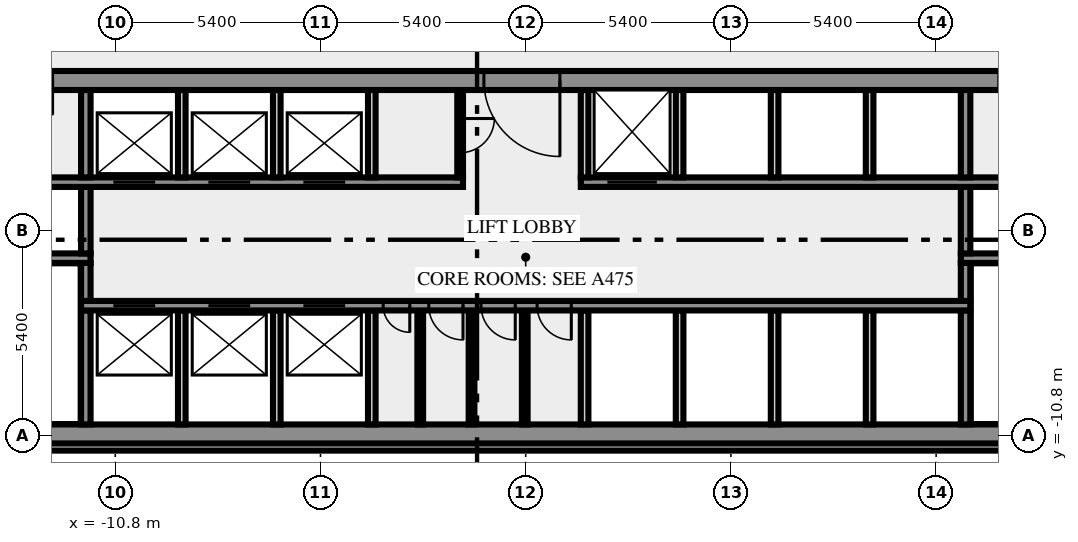
"""IFC4 building model, lengths in metres.
Left out: names, types, materials, properties, quantities, classifications, styles, units other than length and angle.
Written with IfcOpenShell. Run it as: python <this file> out.ifc"""

import sys

from ifc_helpers import new_model, si_unit, direction, frame, frame_2d, origin, place, context, subcontext, project, spatial, rectangle, extrude, element, fill, save


model = new_model("IFC4")
c1 = context("Model", 3, precision=1e-05, world=origin(), true_north=direction((0.0, 1.0)))
c2 = subcontext(c1, "Body", "Model", "MODEL_VIEW")
j1 = project(units=[si_unit("LENGTHUNIT", "METRE"), si_unit("PLANEANGLEUNIT", "RADIAN")], contexts=[c1])
p1 = place(None, origin())
s1 = spatial("IfcSite", under=j1, at=p1, CompositionType="ELEMENT")
p2 = place(p1, origin())
s2 = spatial("IfcBuilding", under=s1, at=p2, CompositionType="ELEMENT")
p3 = place(p2, frame((0.0, 0.0, 129.0)))
s3 = spatial("IfcBuildingStorey", under=s2, at=p3, CompositionType="ELEMENT", Elevation=129.0)
p4 = place(p3, frame((-17.444, -11.088, 0.0), z_axis=(0.0, 0.0, 1.0), x_axis=(1.0, 0.0, 0.0)))
e1 = element("IfcWall", 1, at=p4, inside=s3, PredefinedType="SOLIDWALL", context=c2, shape_type="SweptSolid", body=[
    extrude(rectangle(XDim=34.888, YDim=0.2, at=frame_2d((17.444, 0.0))), origin(), (0.0, 0.0, 1.0), 3.4),
])
p5 = place(p3, frame((-20.0, -10.75, 0.0), z_axis=(0.0, 0.0, 1.0), x_axis=(1.0, 0.0, 0.0)))
e2 = element("IfcWall", 2, at=p5, inside=s3, PredefinedType="SHEAR", context=c2, shape_type="SweptSolid", body=[
    extrude(rectangle(XDim=40.0, YDim=0.5, at=frame_2d((20.0, 0.0))), origin(), (0.0, 0.0, 1.0), 3.4),
])
p6 = place(p5, frame((0.8, 0.0, 1.0)))
e3 = element("IfcOpeningElement", 3, at=p6, cuts=e2, PredefinedType="OPENING", context=c2, shape_type="SweptSolid", body=[
    extrude(rectangle(XDim=1.2, YDim=1.2, at=frame_2d((0.6, 0.6))), frame((0.0, 0.26, 0.0), z_axis=(0.0, -1.0, 0.0), x_axis=(1.0, 0.0, 0.0)), (0.0, 0.0, 1.0), 0.52),
])
p7 = place(p5, frame((38.0, 0.0, 1.0)))
e4 = element("IfcOpeningElement", 4, at=p7, cuts=e2, PredefinedType="OPENING", context=c2, shape_type="SweptSolid", body=[
    extrude(rectangle(XDim=1.2, YDim=1.2, at=frame_2d((0.6, 0.6))), frame((0.0, 0.26, 0.0), z_axis=(0.0, -1.0, 0.0), x_axis=(1.0, 0.0, 0.0)), (0.0, 0.0, 1.0), 0.52),
])
p8 = place(p3, frame((-11.575, -10.5, 0.0), z_axis=(0.0, 0.0, 1.0), x_axis=(0.0, 1.0, 0.0)))
e5 = element("IfcWall", 5, at=p8, inside=s3, PredefinedType="SHEAR", context=c2, shape_type="SweptSolid", body=[
    extrude(rectangle(XDim=3.0, YDim=0.25, at=frame_2d((1.5, 0.0))), origin(), (0.0, 0.0, 1.0), 3.4),
])
for number, where, z_axis, x_axis in (
    (6, (-9.05, -10.5, 0.0), (0.0, 0.0, 1.0), (0.0, 1.0, 0.0)),
    (7, (-6.55, -10.5, 0.0), (0.0, 0.0, 1.0), (0.0, 1.0, 0.0)),
    (8, (-4.05, -10.5, 0.0), (0.0, 0.0, 1.0), (0.0, 1.0, 0.0)),
):
    element("IfcWall", number, at=place(p3, frame(where, z_axis=z_axis, x_axis=x_axis)), inside=s3, PredefinedType="SOLIDWALL", context=c2, shape_type="SweptSolid", body=[
        extrude(rectangle(XDim=3.0, YDim=0.2, at=frame_2d((1.5, 0.0))), origin(), (0.0, 0.0, 1.0), 3.4),
    ])
for number, where, z_axis, x_axis in (
    (9, (-2.775, -10.5, 0.0), (0.0, 0.0, 1.0), (0.0, 1.0, 0.0)),
    (10, (-1.425, -10.5, 0.0), (0.0, 0.0, 1.0), (0.0, 1.0, 0.0)),
    (11, (-0.025, -10.5, 0.0), (0.0, 0.0, 1.0), (0.0, 1.0, 0.0)),
):
    element("IfcWall", number, at=place(p3, frame(where, z_axis=z_axis, x_axis=x_axis)), inside=s3, PredefinedType="PARTITIONING", context=c2, shape_type="SweptSolid", body=[
        extrude(rectangle(XDim=3.0, YDim=0.15, at=frame_2d((1.5, 0.0))), origin(), (0.0, 0.0, 1.0), 3.4),
    ])
for number, where, z_axis, x_axis in (
    (12, (1.55, -10.5, 0.0), (0.0, 0.0, 1.0), (0.0, 1.0, 0.0)),
    (13, (4.05, -10.5, 0.0), (0.0, 0.0, 1.0), (0.0, 1.0, 0.0)),
    (14, (6.55, -10.5, 0.0), (0.0, 0.0, 1.0), (0.0, 1.0, 0.0)),
    (15, (9.05, -10.5, 0.0), (0.0, 0.0, 1.0), (0.0, 1.0, 0.0)),
):
    element("IfcWall", number, at=place(p3, frame(where, z_axis=z_axis, x_axis=x_axis)), inside=s3, PredefinedType="SOLIDWALL", context=c2, shape_type="SweptSolid", body=[
        extrude(rectangle(XDim=3.0, YDim=0.2, at=frame_2d((1.5, 0.0))), origin(), (0.0, 0.0, 1.0), 3.4),
    ])
p9 = place(p3, frame((11.575, -10.5, 0.0), z_axis=(0.0, 0.0, 1.0), x_axis=(0.0, 1.0, 0.0)))
e16 = element("IfcWall", 16, at=p9, inside=s3, PredefinedType="SHEAR", context=c2, shape_type="SweptSolid", body=[
    extrude(rectangle(XDim=3.0, YDim=0.25, at=frame_2d((1.5, 0.0))), origin(), (0.0, 0.0, 1.0), 3.4),
])
p10 = place(p3, frame((11.7, -7.375, 0.0), z_axis=(0.0, 0.0, 1.0), x_axis=(-1.0, 0.0, 0.0)))
e17 = element("IfcWall", 17, at=p10, inside=s3, PredefinedType="SHEAR", context=c2, shape_type="SweptSolid", body=[
    extrude(rectangle(XDim=23.4, YDim=0.25, at=frame_2d((11.7, 0.0))), origin(), (0.0, 0.0, 1.0), 3.4),
])
p11 = place(p10, frame((21.45, 0.0, 0.0)))
e18 = element("IfcOpeningElement", 18, at=p11, cuts=e17, PredefinedType="OPENING", context=c2, shape_type="SweptSolid", body=[
    extrude(rectangle(XDim=1.1, YDim=2.1, at=frame_2d((0.55, 1.05))), frame((0.0, 0.135, 0.0), z_axis=(0.0, -1.0, 0.0), x_axis=(1.0, 0.0, 0.0)), (0.0, 0.0, 1.0), 0.27),
])
p12 = place(p10, frame((18.95, 0.0, 0.0)))
e19 = element("IfcOpeningElement", 19, at=p12, cuts=e17, PredefinedType="OPENING", context=c2, shape_type="SweptSolid", body=[
    extrude(rectangle(XDim=1.1, YDim=2.1, at=frame_2d((0.55, 1.05))), frame((0.0, 0.135, 0.0), z_axis=(0.0, -1.0, 0.0), x_axis=(1.0, 0.0, 0.0)), (0.0, 0.0, 1.0), 0.27),
])
p13 = place(p10, frame((16.45, 0.0, 0.0)))
e20 = element("IfcOpeningElement", 20, at=p13, cuts=e17, PredefinedType="OPENING", context=c2, shape_type="SweptSolid", body=[
    extrude(rectangle(XDim=1.1, YDim=2.1, at=frame_2d((0.55, 1.05))), frame((0.0, 0.135, 0.0), z_axis=(0.0, -1.0, 0.0), x_axis=(1.0, 0.0, 0.0)), (0.0, 0.0, 1.0), 0.27),
])
p14 = place(p10, frame((14.75, 0.0, 0.0)))
e21 = element("IfcOpeningElement", 21, at=p14, cuts=e17, PredefinedType="OPENING", context=c2, shape_type="SweptSolid", body=[
    extrude(rectangle(XDim=0.7, YDim=2.1, at=frame_2d((0.35, 1.05))), frame((0.0, 0.135, 0.0), z_axis=(0.0, -1.0, 0.0), x_axis=(1.0, 0.0, 0.0)), (0.0, 0.0, 1.0), 0.27),
])
p15 = place(p10, frame((13.35, 0.0, 0.0)))
e22 = element("IfcOpeningElement", 22, at=p15, cuts=e17, PredefinedType="OPENING", context=c2, shape_type="SweptSolid", body=[
    extrude(rectangle(XDim=0.9, YDim=2.1, at=frame_2d((0.45, 1.05))), frame((0.0, 0.135, 0.0), z_axis=(0.0, -1.0, 0.0), x_axis=(1.0, 0.0, 0.0)), (0.0, 0.0, 1.0), 0.27),
])
p16 = place(p10, frame((11.975, 0.0, 0.0)))
e23 = element("IfcOpeningElement", 23, at=p16, cuts=e17, PredefinedType="OPENING", context=c2, shape_type="SweptSolid", body=[
    extrude(rectangle(XDim=0.9, YDim=2.1, at=frame_2d((0.45, 1.05))), frame((0.0, 0.135, 0.0), z_axis=(0.0, -1.0, 0.0), x_axis=(1.0, 0.0, 0.0)), (0.0, 0.0, 1.0), 0.27),
])
p17 = place(p10, frame((10.5, 0.0, 0.0)))
e24 = element("IfcOpeningElement", 24, at=p17, cuts=e17, PredefinedType="OPENING", context=c2, shape_type="SweptSolid", body=[
    extrude(rectangle(XDim=0.9, YDim=2.1, at=frame_2d((0.45, 1.05))), frame((0.0, 0.135, 0.0), z_axis=(0.0, -1.0, 0.0), x_axis=(1.0, 0.0, 0.0)), (0.0, 0.0, 1.0), 0.27),
])
for number, where, z_axis, x_axis in (
    (25, (-11.575, -7.25, 0.0), (0.0, 0.0, 1.0), (0.0, 1.0, 0.0)),
    (26, (11.575, -7.25, 0.0), (0.0, 0.0, 1.0), (0.0, 1.0, 0.0)),
):
    element("IfcWall", number, at=place(p3, frame(where, z_axis=z_axis, x_axis=x_axis)), inside=s3, PredefinedType="SHEAR", context=c2, shape_type="SweptSolid", body=[
        extrude(rectangle(XDim=1.0, YDim=0.25, at=frame_2d((0.5, 0.0))), origin(), (0.0, 0.0, 1.0), 3.4),
    ])
p18 = place(p3, frame((-11.45, -6.125, 0.0), z_axis=(0.0, 0.0, 1.0), x_axis=(-1.0, 0.0, 0.0)))
e27 = element("IfcWall", 27, at=p18, inside=s3, PredefinedType="SHEAR", context=c2, shape_type="SweptSolid", body=[
    extrude(rectangle(XDim=8.05, YDim=0.25, at=frame_2d((4.025, 0.0))), origin(), (0.0, 0.0, 1.0), 3.4),
])
p19 = place(p18, frame((6.2, 0.0, 0.0)))
e28 = element("IfcOpeningElement", 28, at=p19, cuts=e27, PredefinedType="OPENING", context=c2, shape_type="SweptSolid", body=[
    extrude(rectangle(XDim=1.8, YDim=2.1, at=frame_2d((0.9, 1.05))), frame((0.0, 0.135, 0.0), z_axis=(0.0, -1.0, 0.0), x_axis=(1.0, 0.0, 0.0)), (0.0, 0.0, 1.0), 0.27),
])
p20 = place(p3, frame((19.5, -6.125, 0.0), z_axis=(0.0, 0.0, 1.0), x_axis=(-1.0, 0.0, 0.0)))
e29 = element("IfcWall", 29, at=p20, inside=s3, PredefinedType="SHEAR", context=c2, shape_type="SweptSolid", body=[
    extrude(rectangle(XDim=8.05, YDim=0.25, at=frame_2d((4.025, 0.0))), origin(), (0.0, 0.0, 1.0), 3.4),
])
p21 = place(p20, frame((0.05, 0.0, 0.0)))
e30 = element("IfcOpeningElement", 30, at=p21, cuts=e29, PredefinedType="OPENING", context=c2, shape_type="SweptSolid", body=[
    extrude(rectangle(XDim=1.8, YDim=2.1, at=frame_2d((0.9, 1.05))), frame((0.0, 0.135, 0.0), z_axis=(0.0, -1.0, 0.0), x_axis=(1.0, 0.0, 0.0)), (0.0, 0.0, 1.0), 0.27),
])
for number, where, z_axis, x_axis in (
    (31, (-11.575, -6.0, 0.0), (0.0, 0.0, 1.0), (0.0, 1.0, 0.0)),
    (32, (11.575, -6.0, 0.0), (0.0, 0.0, 1.0), (0.0, 1.0, 0.0)),
):
    element("IfcWall", number, at=place(p3, frame(where, z_axis=z_axis, x_axis=x_axis)), inside=s3, PredefinedType="SHEAR", context=c2, shape_type="SweptSolid", body=[
        extrude(rectangle(XDim=1.75, YDim=0.25, at=frame_2d((0.875, 0.0))), origin(), (0.0, 0.0, 1.0), 3.4),
    ])
p22 = place(p3, frame((-14.35, -4.125, 0.0), z_axis=(0.0, 0.0, 1.0), x_axis=(1.0, 0.0, 0.0)))
e33 = element("IfcWall", 33, at=p22, inside=s3, PredefinedType="SHEAR", context=c2, shape_type="SweptSolid", body=[
    extrude(rectangle(XDim=12.7, YDim=0.25, at=frame_2d((6.35, 0.0))), origin(), (0.0, 0.0, 1.0), 3.4),
])
p23 = place(p22, frame((3.5, 0.0, 0.0)))
e34 = element("IfcOpeningElement", 34, at=p23, cuts=e33, PredefinedType="OPENING", context=c2, shape_type="SweptSolid", body=[
    extrude(rectangle(XDim=1.1, YDim=2.1, at=frame_2d((0.55, 1.05))), frame((0.0, 0.135, 0.0), z_axis=(0.0, -1.0, 0.0), x_axis=(1.0, 0.0, 0.0)), (0.0, 0.0, 1.0), 0.27),
])
p24 = place(p22, frame((6.0, 0.0, 0.0)))
e35 = element("IfcOpeningElement", 35, at=p24, cuts=e33, PredefinedType="OPENING", context=c2, shape_type="SweptSolid", body=[
    extrude(rectangle(XDim=1.1, YDim=2.1, at=frame_2d((0.55, 1.05))), frame((0.0, 0.135, 0.0), z_axis=(0.0, -1.0, 0.0), x_axis=(1.0, 0.0, 0.0)), (0.0, 0.0, 1.0), 0.27),
])
p25 = place(p22, frame((8.5, 0.0, 0.0)))
e36 = element("IfcOpeningElement", 36, at=p25, cuts=e33, PredefinedType="OPENING", context=c2, shape_type="SweptSolid", body=[
    extrude(rectangle(XDim=1.1, YDim=2.1, at=frame_2d((0.55, 1.05))), frame((0.0, 0.135, 0.0), z_axis=(0.0, -1.0, 0.0), x_axis=(1.0, 0.0, 0.0)), (0.0, 0.0, 1.0), 0.27),
])
p26 = place(p3, frame((1.45, -4.125, 0.0), z_axis=(0.0, 0.0, 1.0), x_axis=(1.0, 0.0, 0.0)))
e37 = element("IfcWall", 37, at=p26, inside=s3, PredefinedType="SHEAR", context=c2, shape_type="SweptSolid", body=[
    extrude(rectangle(XDim=12.9, YDim=0.25, at=frame_2d((6.45, 0.0))), origin(), (0.0, 0.0, 1.0), 3.4),
])
p27 = place(p26, frame((0.7, 0.0, 0.0)))
e38 = element("IfcOpeningElement", 38, at=p27, cuts=e37, PredefinedType="OPENING", context=c2, shape_type="SweptSolid", body=[
    extrude(rectangle(XDim=1.3, YDim=2.1, at=frame_2d((0.65, 1.05))), frame((0.0, 0.135, 0.0), z_axis=(0.0, -1.0, 0.0), x_axis=(1.0, 0.0, 0.0)), (0.0, 0.0, 1.0), 0.27),
])
p28 = place(p3, frame((-11.575, -4.0, 0.0), z_axis=(0.0, 0.0, 1.0), x_axis=(0.0, 1.0, 0.0)))
e39 = element("IfcWall", 39, at=p28, inside=s3, PredefinedType="SHEAR", context=c2, shape_type="SweptSolid", body=[
    extrude(rectangle(XDim=2.3, YDim=0.25, at=frame_2d((1.15, 0.0))), origin(), (0.0, 0.0, 1.0), 3.4),
])
for number, where, z_axis, x_axis in (
    (40, (-9.05, -4.0, 0.0), (0.0, 0.0, 1.0), (0.0, 1.0, 0.0)),
    (41, (-6.55, -4.0, 0.0), (0.0, 0.0, 1.0), (0.0, 1.0, 0.0)),
    (42, (-4.05, -4.0, 0.0), (0.0, 0.0, 1.0), (0.0, 1.0, 0.0)),
):
    element("IfcWall", number, at=place(p3, frame(where, z_axis=z_axis, x_axis=x_axis)), inside=s3, PredefinedType="SOLIDWALL", context=c2, shape_type="SweptSolid", body=[
        extrude(rectangle(XDim=2.3, YDim=0.2, at=frame_2d((1.15, 0.0))), origin(), (0.0, 0.0, 1.0), 3.4),
    ])
p29 = place(p3, frame((-1.725, -1.7, 0.0), z_axis=(0.0, 0.0, 1.0), x_axis=(0.0, -1.0, 0.0)))
e43 = element("IfcWall", 43, at=p29, inside=s3, PredefinedType="PARTITIONING", context=c2, shape_type="SweptSolid", body=[
    extrude(rectangle(XDim=2.3, YDim=0.15, at=frame_2d((1.15, 0.0))), origin(), (0.0, 0.0, 1.0), 3.4),
])
p30 = place(p29, frame((0.75, 0.0, 0.0)))
e44 = element("IfcOpeningElement", 44, at=p30, cuts=e43, PredefinedType="OPENING", context=c2, shape_type="SweptSolid", body=[
    extrude(rectangle(XDim=0.9, YDim=2.1, at=frame_2d((0.45, 1.05))), frame((0.0, 0.085, 0.0), z_axis=(0.0, -1.0, 0.0), x_axis=(1.0, 0.0, 0.0)), (0.0, 0.0, 1.0), 0.17),
])
for number, where, z_axis, x_axis in (
    (45, (1.55, -4.0, 0.0), (0.0, 0.0, 1.0), (0.0, 1.0, 0.0)),
    (46, (4.05, -4.0, 0.0), (0.0, 0.0, 1.0), (0.0, 1.0, 0.0)),
    (47, (6.55, -4.0, 0.0), (0.0, 0.0, 1.0), (0.0, 1.0, 0.0)),
    (48, (9.05, -4.0, 0.0), (0.0, 0.0, 1.0), (0.0, 1.0, 0.0)),
):
    element("IfcWall", number, at=place(p3, frame(where, z_axis=z_axis, x_axis=x_axis)), inside=s3, PredefinedType="SOLIDWALL", context=c2, shape_type="SweptSolid", body=[
        extrude(rectangle(XDim=2.3, YDim=0.2, at=frame_2d((1.15, 0.0))), origin(), (0.0, 0.0, 1.0), 3.4),
    ])
p31 = place(p3, frame((11.575, -4.0, 0.0), z_axis=(0.0, 0.0, 1.0), x_axis=(0.0, 1.0, 0.0)))
e49 = element("IfcWall", 49, at=p31, inside=s3, PredefinedType="SHEAR", context=c2, shape_type="SweptSolid", body=[
    extrude(rectangle(XDim=2.3, YDim=0.25, at=frame_2d((1.15, 0.0))), origin(), (0.0, 0.0, 1.0), 3.4),
])
p32 = place(p3, frame((20.49, -1.45, 0.0), z_axis=(0.0, 0.0, 1.0), x_axis=(-1.0, 0.0, 0.0)))
e50 = element("IfcWall", 50, at=p32, inside=s3, PredefinedType="SHEAR", context=c2, shape_type="SweptSolid", body=[
    extrude(rectangle(XDim=40.98, YDim=0.5, at=frame_2d((20.49, 0.0))), origin(), (0.0, 0.0, 1.0), 3.4),
])
p33 = place(p32, frame((38.14, 0.0, 0.0)))
e51 = element("IfcOpeningElement", 51, at=p33, cuts=e50, PredefinedType="OPENING", context=c2, shape_type="SweptSolid", body=[
    extrude(rectangle(XDim=1.8, YDim=2.1, at=frame_2d((0.9, 1.05))), frame((0.0, 0.26, 0.0), z_axis=(0.0, -1.0, 0.0), x_axis=(1.0, 0.0, 0.0)), (0.0, 0.0, 1.0), 0.52),
])
p34 = place(p32, frame((35.89, 0.0, 0.0)))
e52 = element("IfcOpeningElement", 52, at=p34, cuts=e50, PredefinedType="OPENING", context=c2, shape_type="SweptSolid", body=[
    extrude(rectangle(XDim=0.9, YDim=2.1, at=frame_2d((0.45, 1.05))), frame((0.0, 0.26, 0.0), z_axis=(0.0, -1.0, 0.0), x_axis=(1.0, 0.0, 0.0)), (0.0, 0.0, 1.0), 0.52),
])
p35 = place(p32, frame((32.94, 0.0, 0.0)))
e53 = element("IfcOpeningElement", 53, at=p35, cuts=e50, PredefinedType="OPENING", context=c2, shape_type="SweptSolid", body=[
    extrude(rectangle(XDim=0.9, YDim=2.1, at=frame_2d((0.45, 1.05))), frame((0.0, 0.26, 0.0), z_axis=(0.0, -1.0, 0.0), x_axis=(1.0, 0.0, 0.0)), (0.0, 0.0, 1.0), 0.52),
])
p36 = place(p32, frame((19.59, 0.0, 0.0)))
e54 = element("IfcOpeningElement", 54, at=p36, cuts=e50, PredefinedType="OPENING", context=c2, shape_type="SweptSolid", body=[
    extrude(rectangle(XDim=2.0, YDim=2.1, at=frame_2d((1.0, 1.05))), frame((0.0, 0.26, 0.0), z_axis=(0.0, -1.0, 0.0), x_axis=(1.0, 0.0, 0.0)), (0.0, 0.0, 1.0), 0.52),
])
p37 = place(p32, frame((7.14, 0.0, 0.0)))
e55 = element("IfcOpeningElement", 55, at=p37, cuts=e50, PredefinedType="OPENING", context=c2, shape_type="SweptSolid", body=[
    extrude(rectangle(XDim=0.9, YDim=2.1, at=frame_2d((0.45, 1.05))), frame((0.0, 0.26, 0.0), z_axis=(0.0, -1.0, 0.0), x_axis=(1.0, 0.0, 0.0)), (0.0, 0.0, 1.0), 0.52),
])
p38 = place(p32, frame((5.028, 0.0, 0.0)))
e56 = element("IfcOpeningElement", 56, at=p38, cuts=e50, PredefinedType="OPENING", context=c2, shape_type="SweptSolid", body=[
    extrude(rectangle(XDim=0.8, YDim=2.1, at=frame_2d((0.4, 1.05))), frame((0.0, 0.26, 0.0), z_axis=(0.0, -1.0, 0.0), x_axis=(1.0, 0.0, 0.0)), (0.0, 0.0, 1.0), 0.52),
])
p39 = place(p32, frame((3.452, 0.0, 0.0)))
e57 = element("IfcOpeningElement", 57, at=p39, cuts=e50, PredefinedType="OPENING", context=c2, shape_type="SweptSolid", body=[
    extrude(rectangle(XDim=0.8, YDim=2.1, at=frame_2d((0.4, 1.05))), frame((0.0, 0.26, 0.0), z_axis=(0.0, -1.0, 0.0), x_axis=(1.0, 0.0, 0.0)), (0.0, 0.0, 1.0), 0.52),
])
p40 = place(p32, frame((1.04, 0.0, 0.0)))
e58 = element("IfcOpeningElement", 58, at=p40, cuts=e50, PredefinedType="OPENING", context=c2, shape_type="SweptSolid", body=[
    extrude(rectangle(XDim=1.8, YDim=2.1, at=frame_2d((0.9, 1.05))), frame((0.0, 0.26, 0.0), z_axis=(0.0, -1.0, 0.0), x_axis=(1.0, 0.0, 0.0)), (0.0, 0.0, 1.0), 0.52),
])
p41 = place(p11, origin())
e59 = element("IfcDoor", 59, at=p41, inside=s3, OperationType="DOUBLE_DOOR_SLIDING", PredefinedType="DOOR", context=c2, shape_type="SweptSolid", body=[
    extrude(rectangle(XDim=1.1, YDim=2.1, at=frame_2d((0.55, 1.05))), frame((0.0, 0.025, 0.0), z_axis=(0.0, -1.0, 0.0), x_axis=(1.0, 0.0, 0.0)), (0.0, 0.0, 1.0), 0.05),
])
fill(e18, e59)
p42 = place(p12, origin())
e60 = element("IfcDoor", 60, at=p42, inside=s3, OperationType="DOUBLE_DOOR_SLIDING", PredefinedType="DOOR", context=c2, shape_type="SweptSolid", body=[
    extrude(rectangle(XDim=1.1, YDim=2.1, at=frame_2d((0.55, 1.05))), frame((0.0, 0.025, 0.0), z_axis=(0.0, -1.0, 0.0), x_axis=(1.0, 0.0, 0.0)), (0.0, 0.0, 1.0), 0.05),
])
fill(e19, e60)
p43 = place(p13, origin())
e61 = element("IfcDoor", 61, at=p43, inside=s3, OperationType="DOUBLE_DOOR_SLIDING", PredefinedType="DOOR", context=c2, shape_type="SweptSolid", body=[
    extrude(rectangle(XDim=1.1, YDim=2.1, at=frame_2d((0.55, 1.05))), frame((0.0, 0.025, 0.0), z_axis=(0.0, -1.0, 0.0), x_axis=(1.0, 0.0, 0.0)), (0.0, 0.0, 1.0), 0.05),
])
fill(e20, e61)
p44 = place(p14, origin())
e62 = element("IfcDoor", 62, at=p44, inside=s3, OperationType="SINGLE_SWING_RIGHT", PredefinedType="DOOR", context=c2, shape_type="SweptSolid", body=[
    extrude(rectangle(XDim=0.7, YDim=2.1, at=frame_2d((0.35, 1.05))), frame((0.0, 0.025, 0.0), z_axis=(0.0, -1.0, 0.0), x_axis=(1.0, 0.0, 0.0)), (0.0, 0.0, 1.0), 0.05),
])
fill(e21, e62)
p45 = place(p15, origin())
e63 = element("IfcDoor", 63, at=p45, inside=s3, OperationType="SINGLE_SWING_RIGHT", PredefinedType="DOOR", context=c2, shape_type="SweptSolid", body=[
    extrude(rectangle(XDim=0.9, YDim=2.1, at=frame_2d((0.45, 1.05))), frame((0.0, 0.025, 0.0), z_axis=(0.0, -1.0, 0.0), x_axis=(1.0, 0.0, 0.0)), (0.0, 0.0, 1.0), 0.05),
])
fill(e22, e63)
p46 = place(p16, origin())
e64 = element("IfcDoor", 64, at=p46, inside=s3, OperationType="SINGLE_SWING_RIGHT", PredefinedType="DOOR", context=c2, shape_type="SweptSolid", body=[
    extrude(rectangle(XDim=0.9, YDim=2.1, at=frame_2d((0.45, 1.05))), frame((0.0, 0.025, 0.0), z_axis=(0.0, -1.0, 0.0), x_axis=(1.0, 0.0, 0.0)), (0.0, 0.0, 1.0), 0.05),
])
fill(e23, e64)
p47 = place(p17, origin())
e65 = element("IfcDoor", 65, at=p47, inside=s3, OperationType="SINGLE_SWING_LEFT", PredefinedType="DOOR", context=c2, shape_type="SweptSolid", body=[
    extrude(rectangle(XDim=0.9, YDim=2.1, at=frame_2d((0.45, 1.05))), frame((0.0, 0.025, 0.0), z_axis=(0.0, -1.0, 0.0), x_axis=(1.0, 0.0, 0.0)), (0.0, 0.0, 1.0), 0.05),
])
fill(e24, e65)
p48 = place(p23, origin())
e66 = element("IfcDoor", 66, at=p48, inside=s3, OperationType="DOUBLE_DOOR_SLIDING", PredefinedType="DOOR", context=c2, shape_type="SweptSolid", body=[
    extrude(rectangle(XDim=1.1, YDim=2.1, at=frame_2d((0.55, 1.05))), frame((0.0, 0.025, 0.0), z_axis=(0.0, -1.0, 0.0), x_axis=(1.0, 0.0, 0.0)), (0.0, 0.0, 1.0), 0.05),
])
fill(e34, e66)
p49 = place(p24, origin())
e67 = element("IfcDoor", 67, at=p49, inside=s3, OperationType="DOUBLE_DOOR_SLIDING", PredefinedType="DOOR", context=c2, shape_type="SweptSolid", body=[
    extrude(rectangle(XDim=1.1, YDim=2.1, at=frame_2d((0.55, 1.05))), frame((0.0, 0.025, 0.0), z_axis=(0.0, -1.0, 0.0), x_axis=(1.0, 0.0, 0.0)), (0.0, 0.0, 1.0), 0.05),
])
fill(e35, e67)
p50 = place(p25, origin())
e68 = element("IfcDoor", 68, at=p50, inside=s3, OperationType="DOUBLE_DOOR_SLIDING", PredefinedType="DOOR", context=c2, shape_type="SweptSolid", body=[
    extrude(rectangle(XDim=1.1, YDim=2.1, at=frame_2d((0.55, 1.05))), frame((0.0, 0.025, 0.0), z_axis=(0.0, -1.0, 0.0), x_axis=(1.0, 0.0, 0.0)), (0.0, 0.0, 1.0), 0.05),
])
fill(e36, e68)
p51 = place(p27, origin())
e69 = element("IfcDoor", 69, at=p51, inside=s3, OperationType="DOUBLE_DOOR_SLIDING", PredefinedType="DOOR", context=c2, shape_type="SweptSolid", body=[
    extrude(rectangle(XDim=1.3, YDim=2.1, at=frame_2d((0.65, 1.05))), frame((0.0, 0.025, 0.0), z_axis=(0.0, -1.0, 0.0), x_axis=(1.0, 0.0, 0.0)), (0.0, 0.0, 1.0), 0.05),
])
fill(e38, e69)
p52 = place(p30, origin())
e70 = element("IfcDoor", 70, at=p52, inside=s3, OperationType="SINGLE_SWING_RIGHT", PredefinedType="DOOR", context=c2, shape_type="SweptSolid", body=[
    extrude(rectangle(XDim=0.9, YDim=2.1, at=frame_2d((0.45, 1.05))), frame((0.0, 0.025, 0.0), z_axis=(0.0, -1.0, 0.0), x_axis=(1.0, 0.0, 0.0)), (0.0, 0.0, 1.0), 0.05),
])
fill(e44, e70)
p53 = place(p36, origin())
e71 = element("IfcDoor", 71, at=p53, inside=s3, OperationType="DOUBLE_DOOR_SINGLE_SWING", PredefinedType="DOOR", context=c2, shape_type="SweptSolid", body=[
    extrude(rectangle(XDim=2.0, YDim=2.1, at=frame_2d((1.0, 1.05))), frame((0.0, 0.025, 0.0), z_axis=(0.0, -1.0, 0.0), x_axis=(1.0, 0.0, 0.0)), (0.0, 0.0, 1.0), 0.05),
])
fill(e54, e71)
save(model, sys.argv[1])
